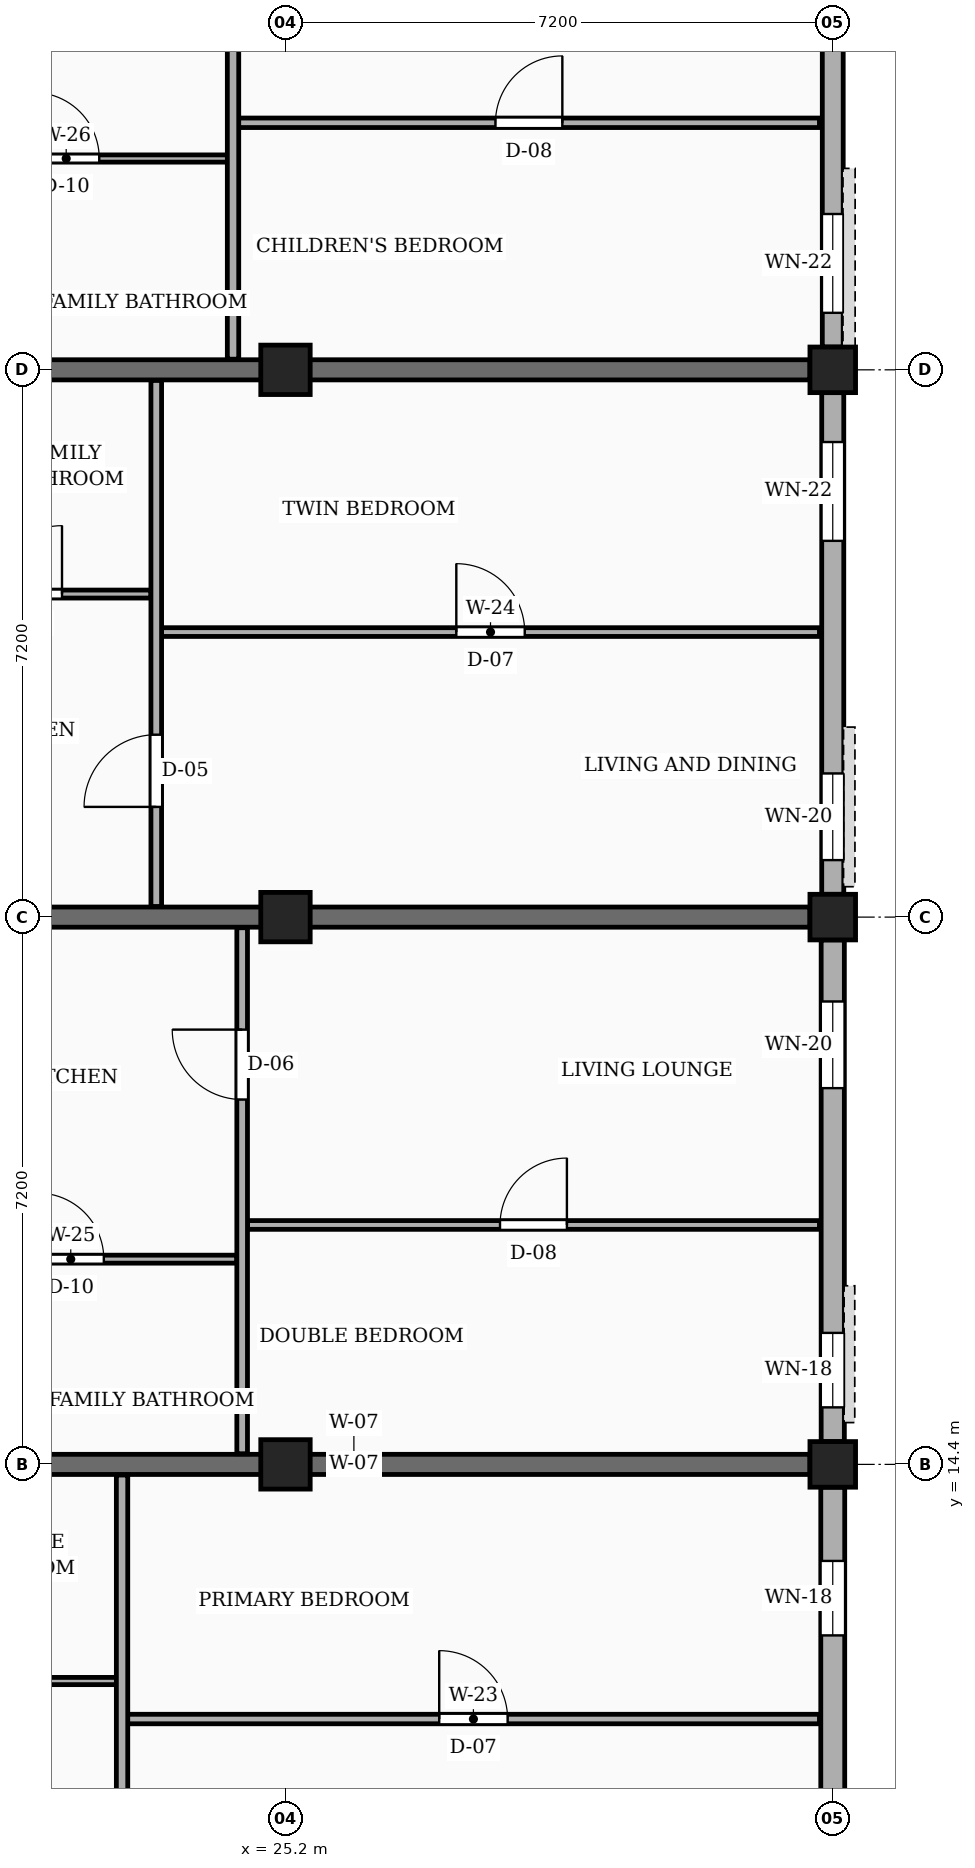
"""IFC4 building model, lengths in metres.
Left out: names, types, materials, properties, quantities, classifications, styles, units other than length and angle.
Written with IfcOpenShell. Run it as: python <this file> out.ifc"""

import sys

from ifc_helpers import new_model, si_unit, direction, frame, frame_2d, origin, origin_2d, place, context, subcontext, project, spatial, rectangle, extrude, element, fill, save


model = new_model("IFC4")
c1 = context("Model", 3, precision=1e-05, world=origin(), true_north=direction((0.0, 1.0)))
c2 = subcontext(c1, "Body", "Model", "MODEL_VIEW")
j1 = project(units=[si_unit("LENGTHUNIT", "METRE"), si_unit("PLANEANGLEUNIT", "RADIAN")], contexts=[c1])
p1 = place(None, origin())
s1 = spatial("IfcSite", under=j1, at=p1, CompositionType="ELEMENT")
p2 = place(p1, origin())
s2 = spatial("IfcBuilding", under=s1, at=p2, CompositionType="ELEMENT")
p3 = place(p2, frame((0.0, 0.0, 4.5)))
s3 = spatial("IfcBuildingStorey", under=s2, at=p3, CompositionType="ELEMENT", Elevation=4.5)
for number, where, z_axis, x_axis in (
    (1, (25.2, 14.4, 0.0), (0.0, 0.0, 1.0), (1.0, 0.0, 0.0)),
    (2, (25.2, 21.6, 0.0), (0.0, 0.0, 1.0), (1.0, 0.0, 0.0)),
    (3, (25.2, 28.8, 0.0), (0.0, 0.0, 1.0), (1.0, 0.0, 0.0)),
):
    element("IfcColumn", number, at=place(p3, frame(where, z_axis=z_axis, x_axis=x_axis)), inside=s3, PredefinedType="COLUMN", context=c2, shape_type="SweptSolid", body=[
        extrude(rectangle(XDim=0.65, YDim=0.65, at=origin_2d()), origin(), (0.0, 0.0, 1.0), 3.15),
    ])
for number, where, z_axis, x_axis in (
    (4, (32.4, 14.4, 0.0), (0.0, 0.0, 1.0), (1.0, 0.0, 0.0)),
    (5, (32.4, 21.6, 0.0), (0.0, 0.0, 1.0), (1.0, 0.0, 0.0)),
    (6, (32.4, 28.8, 0.0), (0.0, 0.0, 1.0), (1.0, 0.0, 0.0)),
):
    element("IfcColumn", number, at=place(p3, frame(where, z_axis=z_axis, x_axis=x_axis)), inside=s3, PredefinedType="COLUMN", context=c2, shape_type="SweptSolid", body=[
        extrude(rectangle(XDim=0.6, YDim=0.6, at=origin_2d()), origin(), (0.0, 0.0, 1.0), 3.15),
    ])
for number, where, z_axis, x_axis in (
    (7, (20.1, 14.4, 0.0), (0.0, 0.0, 1.0), (1.0, 0.0, 0.0)),
    (8, (20.1, 21.6, 0.0), (0.0, 0.0, 1.0), (1.0, 0.0, 0.0)),
    (9, (20.1, 28.8, 0.0), (0.0, 0.0, 1.0), (1.0, 0.0, 0.0)),
):
    element("IfcWall", number, at=place(p3, frame(where, z_axis=z_axis, x_axis=x_axis)), inside=s3, PredefinedType="SOLIDWALL", context=c2, shape_type="SweptSolid", body=[
        extrude(rectangle(XDim=12.0, YDim=0.265, at=frame_2d((6.0, 0.0))), origin(), (0.0, 0.0, 1.0), 2.17),
    ])
p4 = place(p3, frame((32.4, 7.5, 0.0), z_axis=(0.0, 0.0, 1.0), x_axis=(0.0, 1.0, 0.0)))
e10 = element("IfcWall", 10, at=p4, inside=s3, PredefinedType="SOLIDWALL", context=c2, shape_type="SweptSolid", body=[
    extrude(rectangle(XDim=6.6, YDim=0.315, at=frame_2d((3.3, 0.0))), origin(), (0.0, 0.0, 1.0), 2.44),
])
p5 = place(p4, frame((0.45, 0.0, 0.78)))
e11 = element("IfcOpeningElement", 11, at=p5, cuts=e10, PredefinedType="OPENING", context=c2, shape_type="SweptSolid", body=[
    extrude(rectangle(XDim=1.44, YDim=1.26, at=frame_2d((0.72, 0.63))), frame((0.0, 0.167, 0.0), z_axis=(0.0, -1.0, 0.0), x_axis=(1.0, 0.0, 0.0)), (0.0, 0.0, 1.0), 0.335),
])
p6 = place(p4, frame((4.65, 0.0, 0.78)))
e12 = element("IfcOpeningElement", 12, at=p6, cuts=e10, PredefinedType="OPENING", context=c2, shape_type="SweptSolid", body=[
    extrude(rectangle(XDim=0.98, YDim=1.36, at=frame_2d((0.49, 0.68))), frame((0.0, 0.167, 0.0), z_axis=(0.0, -1.0, 0.0), x_axis=(1.0, 0.0, 0.0)), (0.0, 0.0, 1.0), 0.335),
])
p7 = place(p3, frame((32.4, 14.7, 0.0), z_axis=(0.0, 0.0, 1.0), x_axis=(0.0, 1.0, 0.0)))
e13 = element("IfcWall", 13, at=p7, inside=s3, PredefinedType="SOLIDWALL", context=c2, shape_type="SweptSolid", body=[
    extrude(rectangle(XDim=6.6, YDim=0.305, at=frame_2d((3.3, 0.0))), origin(), (0.0, 0.0, 1.0), 2.44),
])
p8 = place(p7, frame((0.45, 0.0, 0.78)))
e14 = element("IfcOpeningElement", 14, at=p8, cuts=e13, PredefinedType="OPENING", context=c2, shape_type="SweptSolid", body=[
    extrude(rectangle(XDim=0.98, YDim=1.36, at=frame_2d((0.49, 0.68))), frame((0.0, 0.163, 0.0), z_axis=(0.0, -1.0, 0.0), x_axis=(1.0, 0.0, 0.0)), (0.0, 0.0, 1.0), 0.325),
])
p9 = place(p7, frame((4.65, 0.0, 0.78)))
e15 = element("IfcOpeningElement", 15, at=p9, cuts=e13, PredefinedType="OPENING", context=c2, shape_type="SweptSolid", body=[
    extrude(rectangle(XDim=1.14, YDim=1.36, at=frame_2d((0.57, 0.68))), frame((0.0, 0.163, 0.0), z_axis=(0.0, -1.0, 0.0), x_axis=(1.0, 0.0, 0.0)), (0.0, 0.0, 1.0), 0.325),
])
p10 = place(p3, frame((32.4, 21.9, 0.0), z_axis=(0.0, 0.0, 1.0), x_axis=(0.0, 1.0, 0.0)))
e16 = element("IfcWall", 16, at=p10, inside=s3, PredefinedType="SOLIDWALL", context=c2, shape_type="SweptSolid", body=[
    extrude(rectangle(XDim=6.6, YDim=0.29, at=frame_2d((3.3, 0.0))), origin(), (0.0, 0.0, 1.0), 2.44),
])
p11 = place(p10, frame((0.45, 0.0, 0.78)))
e17 = element("IfcOpeningElement", 17, at=p11, cuts=e16, PredefinedType="OPENING", context=c2, shape_type="SweptSolid", body=[
    extrude(rectangle(XDim=1.14, YDim=1.36, at=frame_2d((0.57, 0.68))), frame((0.0, 0.155, 0.0), z_axis=(0.0, -1.0, 0.0), x_axis=(1.0, 0.0, 0.0)), (0.0, 0.0, 1.0), 0.31),
])
p12 = place(p10, frame((4.65, 0.0, 0.78)))
e18 = element("IfcOpeningElement", 18, at=p12, cuts=e16, PredefinedType="OPENING", context=c2, shape_type="SweptSolid", body=[
    extrude(rectangle(XDim=1.3, YDim=1.36, at=frame_2d((0.65, 0.68))), frame((0.0, 0.155, 0.0), z_axis=(0.0, -1.0, 0.0), x_axis=(1.0, 0.0, 0.0)), (0.0, 0.0, 1.0), 0.31),
])
p13 = place(p3, frame((32.4, 29.1, 0.0), z_axis=(0.0, 0.0, 1.0), x_axis=(0.0, 1.0, 0.0)))
e19 = element("IfcWall", 19, at=p13, inside=s3, PredefinedType="SOLIDWALL", context=c2, shape_type="SweptSolid", body=[
    extrude(rectangle(XDim=6.6, YDim=0.275, at=frame_2d((3.3, 0.0))), origin(), (0.0, 0.0, 1.0), 2.44),
])
p14 = place(p13, frame((0.45, 0.0, 0.78)))
e20 = element("IfcOpeningElement", 20, at=p14, cuts=e19, PredefinedType="OPENING", context=c2, shape_type="SweptSolid", body=[
    extrude(rectangle(XDim=1.3, YDim=1.36, at=frame_2d((0.65, 0.68))), frame((0.0, 0.147, 0.0), z_axis=(0.0, -1.0, 0.0), x_axis=(1.0, 0.0, 0.0)), (0.0, 0.0, 1.0), 0.295),
])
p15 = place(p13, frame((4.65, 0.0, 0.78)))
e21 = element("IfcOpeningElement", 21, at=p15, cuts=e19, PredefinedType="OPENING", context=c2, shape_type="SweptSolid", body=[
    extrude(rectangle(XDim=1.46, YDim=1.36, at=frame_2d((0.73, 0.68))), frame((0.0, 0.147, 0.0), z_axis=(0.0, -1.0, 0.0), x_axis=(1.0, 0.0, 0.0)), (0.0, 0.0, 1.0), 0.295),
])
p16 = place(p3, frame((23.12, 11.05, 0.0), z_axis=(0.0, 0.0, 1.0), x_axis=(1.0, 0.0, 0.0)))
e22 = element("IfcWall", 22, at=p16, inside=s3, PredefinedType="PARTITIONING", context=c2, shape_type="SweptSolid", body=[
    extrude(rectangle(XDim=9.105, YDim=0.125, at=frame_2d((4.552, 0.0))), origin(), (0.0, 0.0, 1.0), 2.305),
])
p17 = place(p16, frame((4.103, 0.0, 0.0)))
e23 = element("IfcOpeningElement", 23, at=p17, cuts=e22, PredefinedType="OPENING", context=c2, shape_type="SweptSolid", body=[
    extrude(rectangle(XDim=0.9, YDim=2.1, at=frame_2d((0.45, 1.05))), frame((0.0, 0.073, 0.0), z_axis=(0.0, -1.0, 0.0), x_axis=(1.0, 0.0, 0.0)), (0.0, 0.0, 1.0), 0.145),
])
p18 = place(p3, frame((20.19, 11.55, 0.0), z_axis=(0.0, 0.0, 1.0), x_axis=(1.0, 0.0, 0.0)))
e24 = element("IfcWall", 24, at=p18, inside=s3, PredefinedType="PARTITIONING", context=c2, shape_type="SweptSolid", body=[
    extrude(rectangle(XDim=2.79, YDim=0.095, at=frame_2d((1.395, 0.0))), origin(), (0.0, 0.0, 1.0), 2.305),
])
p19 = place(p18, frame((0.945, 0.0, 0.0)))
e25 = element("IfcOpeningElement", 25, at=p19, cuts=e24, PredefinedType="OPENING", context=c2, shape_type="SweptSolid", body=[
    extrude(rectangle(XDim=0.9, YDim=2.05, at=frame_2d((0.45, 1.025))), frame((0.0, 0.058, 0.0), z_axis=(0.0, -1.0, 0.0), x_axis=(1.0, 0.0, 0.0)), (0.0, 0.0, 1.0), 0.115),
])
p20 = place(p3, frame((23.05, 7.375, 0.0), z_axis=(0.0, 0.0, 1.0), x_axis=(0.0, 1.0, 0.0)))
e26 = element("IfcWall", 26, at=p20, inside=s3, PredefinedType="PARTITIONING", context=c2, shape_type="SweptSolid", body=[
    extrude(rectangle(XDim=6.885, YDim=0.15, at=frame_2d((3.442, 0.0))), origin(), (0.0, 0.0, 1.0), 2.305),
])
p21 = place(p20, frame((1.275, 0.0, 0.0)))
e27 = element("IfcOpeningElement", 27, at=p21, cuts=e26, PredefinedType="OPENING", context=c2, shape_type="SweptSolid", body=[
    extrude(rectangle(XDim=0.95, YDim=2.1, at=frame_2d((0.475, 1.05))), frame((0.0, 0.085, 0.0), z_axis=(0.0, -1.0, 0.0), x_axis=(1.0, 0.0, 0.0)), (0.0, 0.0, 1.0), 0.17),
])
p22 = place(p3, frame((24.7, 17.55, 0.0), z_axis=(0.0, 0.0, 1.0), x_axis=(1.0, 0.0, 0.0)))
e28 = element("IfcWall", 28, at=p22, inside=s3, PredefinedType="PARTITIONING", context=c2, shape_type="SweptSolid", body=[
    extrude(rectangle(XDim=7.525, YDim=0.115, at=frame_2d((3.763, 0.0))), origin(), (0.0, 0.0, 1.0), 2.305),
])
p23 = place(p22, frame((3.323, 0.0, 0.0)))
e29 = element("IfcOpeningElement", 29, at=p23, cuts=e28, PredefinedType="OPENING", context=c2, shape_type="SweptSolid", body=[
    extrude(rectangle(XDim=0.88, YDim=2.08, at=frame_2d((0.44, 1.04))), frame((0.0, 0.067, 0.0), z_axis=(0.0, -1.0, 0.0), x_axis=(1.0, 0.0, 0.0)), (0.0, 0.0, 1.0), 0.135),
])
p24 = place(p3, frame((20.19, 17.1, 0.0), z_axis=(0.0, 0.0, 1.0), x_axis=(1.0, 0.0, 0.0)))
e30 = element("IfcWall", 30, at=p24, inside=s3, PredefinedType="PARTITIONING", context=c2, shape_type="SweptSolid", body=[
    extrude(rectangle(XDim=4.37, YDim=0.105, at=frame_2d((2.185, 0.0))), origin(), (0.0, 0.0, 1.0), 2.305),
])
p25 = place(p24, frame((1.75, 0.0, 0.0)))
e31 = element("IfcOpeningElement", 31, at=p25, cuts=e30, PredefinedType="OPENING", context=c2, shape_type="SweptSolid", body=[
    extrude(rectangle(XDim=0.87, YDim=2.05, at=frame_2d((0.435, 1.025))), frame((0.0, 0.062, 0.0), z_axis=(0.0, -1.0, 0.0), x_axis=(1.0, 0.0, 0.0)), (0.0, 0.0, 1.0), 0.125),
])
p26 = place(p3, frame((24.63, 14.54, 0.0), z_axis=(0.0, 0.0, 1.0), x_axis=(0.0, 1.0, 0.0)))
e32 = element("IfcWall", 32, at=p26, inside=s3, PredefinedType="PARTITIONING", context=c2, shape_type="SweptSolid", body=[
    extrude(rectangle(XDim=6.92, YDim=0.14, at=frame_2d((3.46, 0.0))), origin(), (0.0, 0.0, 1.0), 2.305),
])
p27 = place(p26, frame((4.66, 0.0, 0.0)))
e33 = element("IfcOpeningElement", 33, at=p27, cuts=e32, PredefinedType="OPENING", context=c2, shape_type="SweptSolid", body=[
    extrude(rectangle(XDim=0.92, YDim=2.1, at=frame_2d((0.46, 1.05))), frame((0.0, 0.08, 0.0), z_axis=(0.0, -1.0, 0.0), x_axis=(1.0, 0.0, 0.0)), (0.0, 0.0, 1.0), 0.16),
])
p28 = place(p3, frame((23.57, 25.35, 0.0), z_axis=(0.0, 0.0, 1.0), x_axis=(1.0, 0.0, 0.0)))
e34 = element("IfcWall", 34, at=p28, inside=s3, PredefinedType="PARTITIONING", context=c2, shape_type="SweptSolid", body=[
    extrude(rectangle(XDim=8.655, YDim=0.115, at=frame_2d((4.328, 0.0))), origin(), (0.0, 0.0, 1.0), 2.305),
])
p29 = place(p28, frame((3.877, 0.0, 0.0)))
e35 = element("IfcOpeningElement", 35, at=p29, cuts=e34, PredefinedType="OPENING", context=c2, shape_type="SweptSolid", body=[
    extrude(rectangle(XDim=0.9, YDim=2.1, at=frame_2d((0.45, 1.05))), frame((0.0, 0.067, 0.0), z_axis=(0.0, -1.0, 0.0), x_axis=(1.0, 0.0, 0.0)), (0.0, 0.0, 1.0), 0.135),
])
p30 = place(p3, frame((20.19, 25.85, 0.0), z_axis=(0.0, 0.0, 1.0), x_axis=(1.0, 0.0, 0.0)))
e36 = element("IfcWall", 36, at=p30, inside=s3, PredefinedType="PARTITIONING", context=c2, shape_type="SweptSolid", body=[
    extrude(rectangle(XDim=3.24, YDim=0.105, at=frame_2d((1.62, 0.0))), origin(), (0.0, 0.0, 1.0), 2.305),
])
p31 = place(p30, frame((1.17, 0.0, 0.0)))
e37 = element("IfcOpeningElement", 37, at=p31, cuts=e36, PredefinedType="OPENING", context=c2, shape_type="SweptSolid", body=[
    extrude(rectangle(XDim=0.9, YDim=2.05, at=frame_2d((0.45, 1.025))), frame((0.0, 0.062, 0.0), z_axis=(0.0, -1.0, 0.0), x_axis=(1.0, 0.0, 0.0)), (0.0, 0.0, 1.0), 0.125),
])
p32 = place(p3, frame((23.5, 21.74, 0.0), z_axis=(0.0, 0.0, 1.0), x_axis=(0.0, 1.0, 0.0)))
e38 = element("IfcWall", 38, at=p32, inside=s3, PredefinedType="PARTITIONING", context=c2, shape_type="SweptSolid", body=[
    extrude(rectangle(XDim=6.92, YDim=0.14, at=frame_2d((3.46, 0.0))), origin(), (0.0, 0.0, 1.0), 2.305),
])
p33 = place(p32, frame((1.31, 0.0, 0.0)))
e39 = element("IfcOpeningElement", 39, at=p33, cuts=e38, PredefinedType="OPENING", context=c2, shape_type="SweptSolid", body=[
    extrude(rectangle(XDim=0.95, YDim=2.1, at=frame_2d((0.475, 1.05))), frame((0.0, 0.08, 0.0), z_axis=(0.0, -1.0, 0.0), x_axis=(1.0, 0.0, 0.0)), (0.0, 0.0, 1.0), 0.16),
])
p34 = place(p3, frame((24.58, 32.05, 0.0), z_axis=(0.0, 0.0, 1.0), x_axis=(1.0, 0.0, 0.0)))
e40 = element("IfcWall", 40, at=p34, inside=s3, PredefinedType="PARTITIONING", context=c2, shape_type="SweptSolid", body=[
    extrude(rectangle(XDim=7.645, YDim=0.125, at=frame_2d((3.823, 0.0))), origin(), (0.0, 0.0, 1.0), 2.305),
])
p35 = place(p34, frame((3.383, 0.0, 0.0)))
e41 = element("IfcOpeningElement", 41, at=p35, cuts=e40, PredefinedType="OPENING", context=c2, shape_type="SweptSolid", body=[
    extrude(rectangle(XDim=0.88, YDim=2.08, at=frame_2d((0.44, 1.04))), frame((0.0, 0.073, 0.0), z_axis=(0.0, -1.0, 0.0), x_axis=(1.0, 0.0, 0.0)), (0.0, 0.0, 1.0), 0.145),
])
p36 = place(p3, frame((20.19, 31.58, 0.0), z_axis=(0.0, 0.0, 1.0), x_axis=(1.0, 0.0, 0.0)))
e42 = element("IfcWall", 42, at=p36, inside=s3, PredefinedType="PARTITIONING", context=c2, shape_type="SweptSolid", body=[
    extrude(rectangle(XDim=4.25, YDim=0.095, at=frame_2d((2.125, 0.0))), origin(), (0.0, 0.0, 1.0), 2.305),
])
p37 = place(p36, frame((1.69, 0.0, 0.0)))
e43 = element("IfcOpeningElement", 43, at=p37, cuts=e42, PredefinedType="OPENING", context=c2, shape_type="SweptSolid", body=[
    extrude(rectangle(XDim=0.87, YDim=2.05, at=frame_2d((0.435, 1.025))), frame((0.0, 0.058, 0.0), z_axis=(0.0, -1.0, 0.0), x_axis=(1.0, 0.0, 0.0)), (0.0, 0.0, 1.0), 0.115),
])
p38 = place(p3, frame((24.51, 28.94, 0.0), z_axis=(0.0, 0.0, 1.0), x_axis=(0.0, 1.0, 0.0)))
e44 = element("IfcWall", 44, at=p38, inside=s3, PredefinedType="PARTITIONING", context=c2, shape_type="SweptSolid", body=[
    extrude(rectangle(XDim=6.92, YDim=0.15, at=frame_2d((3.46, 0.0))), origin(), (0.0, 0.0, 1.0), 2.305),
])
p39 = place(p38, frame((4.66, 0.0, 0.0)))
e45 = element("IfcOpeningElement", 45, at=p39, cuts=e44, PredefinedType="OPENING", context=c2, shape_type="SweptSolid", body=[
    extrude(rectangle(XDim=0.92, YDim=2.1, at=frame_2d((0.46, 1.05))), frame((0.0, 0.085, 0.0), z_axis=(0.0, -1.0, 0.0), x_axis=(1.0, 0.0, 0.0)), (0.0, 0.0, 1.0), 0.17),
])
p40 = place(p6, origin())
e46 = element("IfcWindow", 46, at=p40, inside=s3, PartitioningType="SINGLE_PANEL", PredefinedType="WINDOW", context=c2, shape_type="SweptSolid", body=[
    extrude(rectangle(XDim=0.98, YDim=1.36, at=frame_2d((0.49, 0.68))), frame((0.0, 0.03, 0.0), z_axis=(0.0, -1.0, 0.0), x_axis=(1.0, 0.0, 0.0)), (0.0, 0.0, 1.0), 0.06),
])
fill(e12, e46)
p41 = place(p8, origin())
e47 = element("IfcWindow", 47, at=p41, inside=s3, PartitioningType="SINGLE_PANEL", PredefinedType="WINDOW", context=c2, shape_type="SweptSolid", body=[
    extrude(rectangle(XDim=0.98, YDim=1.36, at=frame_2d((0.49, 0.68))), frame((0.0, 0.03, 0.0), z_axis=(0.0, -1.0, 0.0), x_axis=(1.0, 0.0, 0.0)), (0.0, 0.0, 1.0), 0.06),
])
fill(e14, e47)
p42 = place(p9, origin())
e48 = element("IfcWindow", 48, at=p42, inside=s3, PartitioningType="SINGLE_PANEL", PredefinedType="WINDOW", context=c2, shape_type="SweptSolid", body=[
    extrude(rectangle(XDim=1.14, YDim=1.36, at=frame_2d((0.57, 0.68))), frame((0.0, 0.03, 0.0), z_axis=(0.0, -1.0, 0.0), x_axis=(1.0, 0.0, 0.0)), (0.0, 0.0, 1.0), 0.06),
])
fill(e15, e48)
p43 = place(p11, origin())
e49 = element("IfcWindow", 49, at=p43, inside=s3, PartitioningType="SINGLE_PANEL", PredefinedType="WINDOW", context=c2, shape_type="SweptSolid", body=[
    extrude(rectangle(XDim=1.14, YDim=1.36, at=frame_2d((0.57, 0.68))), frame((0.0, 0.03, 0.0), z_axis=(0.0, -1.0, 0.0), x_axis=(1.0, 0.0, 0.0)), (0.0, 0.0, 1.0), 0.06),
])
fill(e17, e49)
p44 = place(p12, origin())
e50 = element("IfcWindow", 50, at=p44, inside=s3, PartitioningType="SINGLE_PANEL", PredefinedType="WINDOW", context=c2, shape_type="SweptSolid", body=[
    extrude(rectangle(XDim=1.3, YDim=1.36, at=frame_2d((0.65, 0.68))), frame((0.0, 0.03, 0.0), z_axis=(0.0, -1.0, 0.0), x_axis=(1.0, 0.0, 0.0)), (0.0, 0.0, 1.0), 0.06),
])
fill(e18, e50)
p45 = place(p14, origin())
e51 = element("IfcWindow", 51, at=p45, inside=s3, PartitioningType="SINGLE_PANEL", PredefinedType="WINDOW", context=c2, shape_type="SweptSolid", body=[
    extrude(rectangle(XDim=1.3, YDim=1.36, at=frame_2d((0.65, 0.68))), frame((0.0, 0.03, 0.0), z_axis=(0.0, -1.0, 0.0), x_axis=(1.0, 0.0, 0.0)), (0.0, 0.0, 1.0), 0.06),
])
fill(e20, e51)
p46 = place(p17, origin())
e52 = element("IfcDoor", 52, at=p46, inside=s3, OperationType="SINGLE_SWING_LEFT", PredefinedType="DOOR", context=c2, shape_type="SweptSolid", body=[
    extrude(rectangle(XDim=0.9, YDim=2.1, at=frame_2d((0.45, 1.05))), frame((0.0, 0.025, 0.0), z_axis=(0.0, -1.0, 0.0), x_axis=(1.0, 0.0, 0.0)), (0.0, 0.0, 1.0), 0.05),
])
fill(e23, e52)
p47 = place(p23, origin())
e53 = element("IfcDoor", 53, at=p47, inside=s3, OperationType="SINGLE_SWING_RIGHT", PredefinedType="DOOR", context=c2, shape_type="SweptSolid", body=[
    extrude(rectangle(XDim=0.88, YDim=2.08, at=frame_2d((0.44, 1.04))), frame((0.0, 0.025, 0.0), z_axis=(0.0, -1.0, 0.0), x_axis=(1.0, 0.0, 0.0)), (0.0, 0.0, 1.0), 0.05),
])
fill(e29, e53)
p48 = place(p25, origin())
e54 = element("IfcDoor", 54, at=p48, inside=s3, OperationType="SINGLE_SWING_LEFT", PredefinedType="DOOR", context=c2, shape_type="SweptSolid", body=[
    extrude(rectangle(XDim=0.87, YDim=2.05, at=frame_2d((0.435, 1.025))), frame((0.0, 0.025, 0.0), z_axis=(0.0, -1.0, 0.0), x_axis=(1.0, 0.0, 0.0)), (0.0, 0.0, 1.0), 0.05),
])
fill(e31, e54)
p49 = place(p27, origin())
e55 = element("IfcDoor", 55, at=p49, inside=s3, OperationType="SINGLE_SWING_RIGHT", PredefinedType="DOOR", context=c2, shape_type="SweptSolid", body=[
    extrude(rectangle(XDim=0.92, YDim=2.1, at=frame_2d((0.46, 1.05))), frame((0.0, 0.025, 0.0), z_axis=(0.0, -1.0, 0.0), x_axis=(1.0, 0.0, 0.0)), (0.0, 0.0, 1.0), 0.05),
])
fill(e33, e55)
p50 = place(p29, origin())
e56 = element("IfcDoor", 56, at=p50, inside=s3, OperationType="SINGLE_SWING_LEFT", PredefinedType="DOOR", context=c2, shape_type="SweptSolid", body=[
    extrude(rectangle(XDim=0.9, YDim=2.1, at=frame_2d((0.45, 1.05))), frame((0.0, 0.025, 0.0), z_axis=(0.0, -1.0, 0.0), x_axis=(1.0, 0.0, 0.0)), (0.0, 0.0, 1.0), 0.05),
])
fill(e35, e56)
p51 = place(p31, origin())
e57 = element("IfcDoor", 57, at=p51, inside=s3, OperationType="SINGLE_SWING_RIGHT", PredefinedType="DOOR", context=c2, shape_type="SweptSolid", body=[
    extrude(rectangle(XDim=0.9, YDim=2.05, at=frame_2d((0.45, 1.025))), frame((0.0, 0.025, 0.0), z_axis=(0.0, -1.0, 0.0), x_axis=(1.0, 0.0, 0.0)), (0.0, 0.0, 1.0), 0.05),
])
fill(e37, e57)
p52 = place(p33, origin())
e58 = element("IfcDoor", 58, at=p52, inside=s3, OperationType="SINGLE_SWING_LEFT", PredefinedType="DOOR", context=c2, shape_type="SweptSolid", body=[
    extrude(rectangle(XDim=0.95, YDim=2.1, at=frame_2d((0.475, 1.05))), frame((0.0, 0.025, 0.0), z_axis=(0.0, -1.0, 0.0), x_axis=(1.0, 0.0, 0.0)), (0.0, 0.0, 1.0), 0.05),
])
fill(e39, e58)
p53 = place(p35, origin())
e59 = element("IfcDoor", 59, at=p53, inside=s3, OperationType="SINGLE_SWING_RIGHT", PredefinedType="DOOR", context=c2, shape_type="SweptSolid", body=[
    extrude(rectangle(XDim=0.88, YDim=2.08, at=frame_2d((0.44, 1.04))), frame((0.0, 0.025, 0.0), z_axis=(0.0, -1.0, 0.0), x_axis=(1.0, 0.0, 0.0)), (0.0, 0.0, 1.0), 0.05),
])
fill(e41, e59)
p54 = place(p37, origin())
e60 = element("IfcDoor", 60, at=p54, inside=s3, OperationType="SINGLE_SWING_LEFT", PredefinedType="DOOR", context=c2, shape_type="SweptSolid", body=[
    extrude(rectangle(XDim=0.87, YDim=2.05, at=frame_2d((0.435, 1.025))), frame((0.0, 0.025, 0.0), z_axis=(0.0, -1.0, 0.0), x_axis=(1.0, 0.0, 0.0)), (0.0, 0.0, 1.0), 0.05),
])
fill(e43, e60)
save(model, sys.argv[1])
